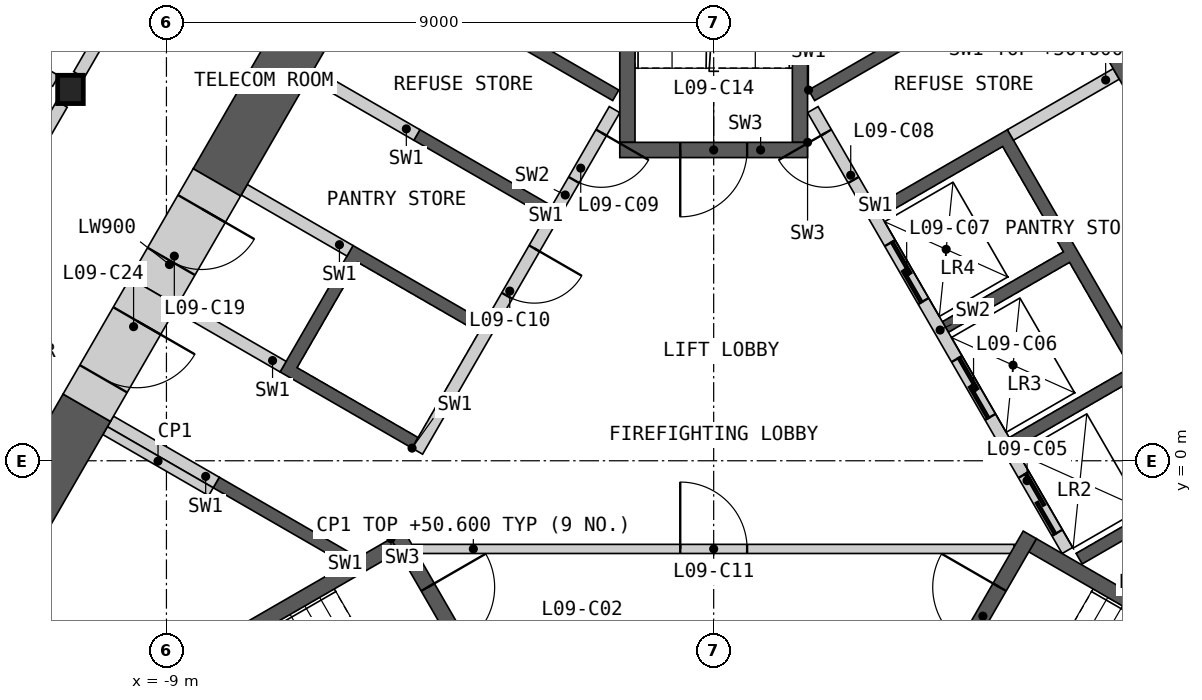
"""IFC4 building model, lengths in metres.
Left out: names, types, materials, properties, quantities, classifications, styles, units other than length and angle.
Written with IfcOpenShell. Run it as: python <this file> out.ifc"""

import sys

from ifc_helpers import new_model, si_unit, direction, frame, frame_2d, origin, origin_2d, place, context, subcontext, project, spatial, polyline, rectangle, i_section, outline, extrude, element, fill, save


model = new_model("IFC4")
c1 = context("Model", 3, precision=1e-05, world=origin(), true_north=direction((0.0, 1.0)))
c2 = subcontext(c1, "Body", "Model", "MODEL_VIEW")
j1 = project(units=[si_unit("LENGTHUNIT", "METRE"), si_unit("PLANEANGLEUNIT", "RADIAN")], contexts=[c1])
p1 = place(None, origin())
s1 = spatial("IfcSite", under=j1, at=p1, CompositionType="ELEMENT")
p2 = place(p1, origin())
s2 = spatial("IfcBuilding", under=s1, at=p2, CompositionType="ELEMENT")
p3 = place(p2, frame((0.0, 0.0, 46.8)))
s3 = spatial("IfcBuildingStorey", under=s2, at=p3, CompositionType="ELEMENT", Elevation=46.8)
p4 = place(p3, frame((-10.578, 6.107, 0.0), z_axis=(0.0, 0.0, 1.0), x_axis=(1.0, 0.0, 0.0)))
e1 = element("IfcColumn", 1, at=p4, inside=s3, PredefinedType="COLUMN", context=c2, shape_type="SweptSolid", body=[
    extrude(i_section(OverallWidth=0.421, OverallDepth=0.465, WebThickness=0.045, FlangeThickness=0.072, at=origin_2d()), origin(), (0.0, 0.0, 1.0), 4.2),
])
p5 = place(p3, origin())
e2 = element("IfcWall", 2, at=p5, inside=s3, PredefinedType="SHEAR", context=c2, shape_type="SweptSolid", body=[
    extrude(outline(polyline([(1.561, 6.097), (3.731, 7.35), (3.831, 7.177), (1.66, 5.924), (1.561, 6.097)])), origin(), (0.0, 0.0, 1.0), 3.8),
])
p6 = place(p3, origin())
e3 = element("IfcWall", 3, at=p6, inside=s3, PredefinedType="SHEAR", context=c2, shape_type="SweptSolid", body=[
    extrude(outline(polyline([(2.66, 4.192), (4.831, 5.445), (8.231, -0.444), (6.061, -1.697), (5.96, -1.524), (7.952, -0.374), (6.952, 1.358), (4.96, 0.208), (4.861, 0.381), (6.852, 1.531), (5.852, 3.263), (3.861, 2.113), (3.76, 2.287), (5.752, 3.437), (4.752, 5.169), (2.76, 4.019), (2.66, 4.192)])), origin(), (0.0, 0.0, 1.0), 3.8),
])
p7 = place(p3, frame((5.817, -1.476, 0.0), z_axis=(0.0, 0.0, 1.0), x_axis=(-0.500002616675, 0.866023893041, 0.0)))
e4 = element("IfcWall", 4, at=p7, inside=s3, PredefinedType="SOLIDWALL", context=c2, shape_type="SweptSolid", body=[
    extrude(rectangle(XDim=8.373, YDim=0.2, at=frame_2d((4.187, 0.0))), origin(), (0.0, 0.0, 1.0), 3.8),
])
p8 = place(p7, frame((0.337, 0.0, 0.0)))
e5 = element("IfcOpeningElement", 5, at=p8, cuts=e4, PredefinedType="OPENING", context=c2, shape_type="SweptSolid", body=[
    extrude(rectangle(XDim=1.1, YDim=2.1, at=frame_2d((0.55, 1.05))), frame((0.0, 0.11, 0.0), z_axis=(0.0, -1.0, 0.0), x_axis=(1.0, 0.0, 0.0)), (0.0, 0.0, 1.0), 0.22),
])
p9 = place(p7, frame((2.537, 0.0, 0.0)))
e6 = element("IfcOpeningElement", 6, at=p9, cuts=e4, PredefinedType="OPENING", context=c2, shape_type="SweptSolid", body=[
    extrude(rectangle(XDim=1.1, YDim=2.1, at=frame_2d((0.55, 1.05))), frame((0.0, 0.11, 0.0), z_axis=(0.0, -1.0, 0.0), x_axis=(1.0, 0.0, 0.0)), (0.0, 0.0, 1.0), 0.22),
])
p10 = place(p7, frame((4.737, 0.0, 0.0)))
e7 = element("IfcOpeningElement", 7, at=p10, cuts=e4, PredefinedType="OPENING", context=c2, shape_type="SweptSolid", body=[
    extrude(rectangle(XDim=1.1, YDim=2.1, at=frame_2d((0.55, 1.05))), frame((0.0, 0.11, 0.0), z_axis=(0.0, -1.0, 0.0), x_axis=(1.0, 0.0, 0.0)), (0.0, 0.0, 1.0), 0.22),
])
p11 = place(p7, frame((7.037, 0.0, 0.0)))
e8 = element("IfcOpeningElement", 8, at=p11, cuts=e4, PredefinedType="OPENING", context=c2, shape_type="SweptSolid", body=[
    extrude(rectangle(XDim=0.9, YDim=2.1, at=frame_2d((0.45, 1.05))), frame((0.0, 0.11, 0.0), z_axis=(0.0, -1.0, 0.0), x_axis=(1.0, 0.0, 0.0)), (0.0, 0.0, 1.0), 0.22),
])
p12 = place(p3, frame((4.881, 5.358, 0.0), z_axis=(0.0, 0.0, 1.0), x_axis=(0.866035824272, 0.499981950752, 0.0)))
e9 = element("IfcWall", 9, at=p12, inside=s3, PredefinedType="SHEAR", context=c2, shape_type="SweptSolid", body=[
    extrude(rectangle(XDim=2.009, YDim=0.2, at=frame_2d((1.004, 0.0))), origin(), (0.0, 0.0, 1.0), 3.8),
])
p13 = place(p3, origin())
e10 = element("IfcWall", 10, at=p13, inside=s3, PredefinedType="SHEAR", context=c2, shape_type="SweptSolid", body=[
    extrude(outline(polyline([(-6.061, -1.697), (-8.231, -0.444), (-8.131, -0.271), (-5.96, -1.524), (-6.061, -1.697)])), origin(), (0.0, 0.0, 1.0), 3.8),
])
p14 = place(p3, origin())
e11 = element("IfcWall", 11, at=p14, inside=s3, PredefinedType="SHEAR", context=c2, shape_type="SweptSolid", body=[
    extrude(outline(polyline([(-4.96, 0.208), (-7.131, 1.461), (-5.931, 3.54), (-3.76, 2.287), (-3.861, 2.113), (-5.852, 3.263), (-6.852, 1.531), (-4.861, 0.381), (-4.96, 0.208)])), origin(), (0.0, 0.0, 1.0), 3.8),
])
p15 = place(p3, origin())
e12 = element("IfcWall", 12, at=p15, inside=s3, PredefinedType="SHEAR", context=c2, shape_type="SweptSolid", body=[
    extrude(outline(polyline([(-2.76, 4.019), (-4.931, 5.272), (-4.831, 5.445), (-2.66, 4.192), (-2.76, 4.019)])), origin(), (0.0, 0.0, 1.0), 3.8),
])
p16 = place(p3, origin())
e13 = element("IfcWall", 13, at=p16, inside=s3, PredefinedType="SHEAR", context=c2, shape_type="SweptSolid", body=[
    extrude(outline(polyline([(-3.731, 7.35), (-1.561, 6.097), (-1.66, 5.924), (-3.831, 7.177), (-3.731, 7.35)])), origin(), (0.0, 0.0, 1.0), 3.8),
])
p17 = place(p3, frame((-1.631, 5.776, 0.0), z_axis=(0.0, 0.0, 1.0), x_axis=(-0.499992876559, -0.866029516466, 0.0)))
e14 = element("IfcWall", 14, at=p17, inside=s3, PredefinedType="SOLIDWALL", context=c2, shape_type="SweptSolid", body=[
    extrude(rectangle(XDim=6.486, YDim=0.2, at=frame_2d((3.243, 0.0))), origin(), (0.0, 0.0, 1.0), 3.8),
])
p18 = place(p17, frame((0.437, 0.0, 0.0)))
e15 = element("IfcOpeningElement", 15, at=p18, cuts=e14, PredefinedType="OPENING", context=c2, shape_type="SweptSolid", body=[
    extrude(rectangle(XDim=0.9, YDim=2.1, at=frame_2d((0.45, 1.05))), frame((0.0, 0.11, 0.0), z_axis=(0.0, -1.0, 0.0), x_axis=(1.0, 0.0, 0.0)), (0.0, 0.0, 1.0), 0.22),
])
p19 = place(p17, frame((2.637, 0.0, 0.0)))
e16 = element("IfcOpeningElement", 16, at=p19, cuts=e14, PredefinedType="OPENING", context=c2, shape_type="SweptSolid", body=[
    extrude(rectangle(XDim=0.9, YDim=2.1, at=frame_2d((0.45, 1.05))), frame((0.0, 0.11, 0.0), z_axis=(0.0, -1.0, 0.0), x_axis=(1.0, 0.0, 0.0)), (0.0, 0.0, 1.0), 0.22),
])
p20 = place(p3, frame((-4.881, 5.358, 0.0), z_axis=(0.0, 0.0, 1.0), x_axis=(-0.866035824272, 0.499981950752, 0.0)))
e17 = element("IfcWall", 17, at=p20, inside=s3, PredefinedType="SHEAR", context=c2, shape_type="SweptSolid", body=[
    extrude(rectangle(XDim=2.009, YDim=0.2, at=frame_2d((1.004, 0.0))), origin(), (0.0, 0.0, 1.0), 3.8),
])
p21 = place(p3, frame((-5.981, 3.453, 0.0), z_axis=(0.0, 0.0, 1.0), x_axis=(-0.866013584312, 0.500020471368, 0.0)))
e18 = element("IfcWall", 18, at=p21, inside=s3, PredefinedType="SHEAR", context=c2, shape_type="SweptSolid", body=[
    extrude(rectangle(XDim=2.009, YDim=0.2, at=frame_2d((1.005, 0.0))), origin(), (0.0, 0.0, 1.0), 3.8),
])
p22 = place(p3, frame((-7.081, 1.548, 0.0), z_axis=(0.0, 0.0, 1.0), x_axis=(-0.865983199114, 0.50007309351, 0.0)))
e19 = element("IfcWall", 19, at=p22, inside=s3, PredefinedType="SHEAR", context=c2, shape_type="SweptSolid", body=[
    extrude(rectangle(XDim=2.009, YDim=0.2, at=frame_2d((1.004, 0.0))), origin(), (0.0, 0.0, 1.0), 3.8),
])
p23 = place(p3, frame((-8.181, -0.357, 0.0), z_axis=(0.0, 0.0, 1.0), x_axis=(-0.866035824272, 0.499981950752, 0.0)))
e20 = element("IfcWall", 20, at=p23, inside=s3, PredefinedType="SHEAR", context=c2, shape_type="SweptSolid", body=[
    extrude(rectangle(XDim=2.009, YDim=0.2, at=frame_2d((1.004, 0.0))), origin(), (0.0, 0.0, 1.0), 3.8),
])
p24 = place(p3, frame((-4.941, -1.45, 0.0), z_axis=(0.0, 0.0, 1.0), x_axis=(1.0, 0.0, 0.0)))
e21 = element("IfcWall", 21, at=p24, inside=s3, PredefinedType="PARTITIONING", context=c2, shape_type="SweptSolid", body=[
    extrude(rectangle(XDim=9.882, YDim=0.15, at=frame_2d((4.941, 0.0))), origin(), (0.0, 0.0, 1.0), 3.8),
])
p25 = place(p24, frame((4.391, 0.0, 0.0)))
e22 = element("IfcOpeningElement", 22, at=p25, cuts=e21, PredefinedType="OPENING", context=c2, shape_type="SweptSolid", body=[
    extrude(rectangle(XDim=1.1, YDim=2.1, at=frame_2d((0.55, 1.05))), frame((0.0, 0.085, 0.0), z_axis=(0.0, -1.0, 0.0), x_axis=(1.0, 0.0, 0.0)), (0.0, 0.0, 1.0), 0.17),
])
p26 = place(p3, origin())
e23 = element("IfcWall", 23, at=p26, inside=s3, PredefinedType="SHEAR", context=c2, shape_type="SweptSolid", body=[
    extrude(outline(polyline([(-5.307, -1.281), (-10.374, -4.206), (-10.032, -4.298), (-5.182, -1.498), (-5.307, -1.281)])), origin(), (0.0, 0.0, 1.0), 3.8),
])
p27 = place(p3, frame((-5.199, -1.219, 0.0), z_axis=(0.0, 0.0, 1.0), x_axis=(0.499982516597, -0.866035497597, 0.0)))
e24 = element("IfcWall", 24, at=p27, inside=s3, PredefinedType="SHEAR", context=c2, shape_type="SweptSolid", body=[
    extrude(rectangle(XDim=3.088, YDim=0.25, at=frame_2d((1.544, 0.0))), origin(), (0.0, 0.0, 1.0), 3.8),
])
p28 = place(p27, frame((0.994, 0.0, 0.0)))
e25 = element("IfcOpeningElement", 25, at=p28, cuts=e24, PredefinedType="OPENING", context=c2, shape_type="SweptSolid", body=[
    extrude(rectangle(XDim=1.1, YDim=2.1, at=frame_2d((0.55, 1.05))), frame((0.0, 0.135, 0.0), z_axis=(0.0, -1.0, 0.0), x_axis=(1.0, 0.0, 0.0)), (0.0, 0.0, 1.0), 0.27),
])
p29 = place(p3, origin())
e26 = element("IfcWall", 26, at=p29, inside=s3, PredefinedType="SHEAR", context=c2, shape_type="SweptSolid", body=[
    extrude(outline(polyline([(10.032, -4.298), (10.374, -4.206), (5.307, -1.281), (5.182, -1.498), (10.032, -4.298)])), origin(), (0.0, 0.0, 1.0), 3.8),
])
p30 = place(p3, frame((3.655, -3.893, 0.0), z_axis=(0.0, 0.0, 1.0), x_axis=(0.499982516597, 0.866035497597, 0.0)))
e27 = element("IfcWall", 27, at=p30, inside=s3, PredefinedType="SHEAR", context=c2, shape_type="SweptSolid", body=[
    extrude(rectangle(XDim=3.088, YDim=0.25, at=frame_2d((1.544, 0.0))), origin(), (0.0, 0.0, 1.0), 3.8),
])
p31 = place(p30, frame((0.994, 0.0, 0.0)))
e28 = element("IfcOpeningElement", 28, at=p31, cuts=e27, PredefinedType="OPENING", context=c2, shape_type="SweptSolid", body=[
    extrude(rectangle(XDim=1.1, YDim=2.1, at=frame_2d((0.55, 1.05))), frame((0.0, 0.135, 0.0), z_axis=(0.0, -1.0, 0.0), x_axis=(1.0, 0.0, 0.0)), (0.0, 0.0, 1.0), 0.27),
])
p32 = place(p3, origin())
e29 = element("IfcWall", 29, at=p32, inside=s3, PredefinedType="SHEAR", context=c2, shape_type="SweptSolid", body=[
    extrude(outline(polyline([(1.544, 5.237), (1.544, 11.087), (1.294, 10.837), (1.294, 5.237), (1.544, 5.237)])), origin(), (0.0, 0.0, 1.0), 3.8),
])
p33 = place(p3, origin())
e30 = element("IfcWall", 30, at=p33, inside=s3, PredefinedType="SHEAR", context=c2, shape_type="SweptSolid", body=[
    extrude(outline(polyline([(-1.294, 10.837), (-1.544, 11.087), (-1.544, 5.237), (-1.294, 5.237), (-1.294, 10.837)])), origin(), (0.0, 0.0, 1.0), 3.8),
])
p34 = place(p3, frame((1.544, 5.112, 0.0), z_axis=(0.0, 0.0, 1.0), x_axis=(-1.0, 0.0, 0.0)))
e31 = element("IfcWall", 31, at=p34, inside=s3, PredefinedType="SHEAR", context=c2, shape_type="SweptSolid", body=[
    extrude(rectangle(XDim=3.088, YDim=0.25, at=frame_2d((1.544, 0.0))), origin(), (0.0, 0.0, 1.0), 3.8),
])
p35 = place(p34, frame((0.994, 0.0, 0.0)))
e32 = element("IfcOpeningElement", 32, at=p35, cuts=e31, PredefinedType="OPENING", context=c2, shape_type="SweptSolid", body=[
    extrude(rectangle(XDim=1.1, YDim=2.1, at=frame_2d((0.55, 1.05))), frame((0.0, 0.135, 0.0), z_axis=(0.0, -1.0, 0.0), x_axis=(1.0, 0.0, 0.0)), (0.0, 0.0, 1.0), 0.27),
])
p36 = place(p3, frame((-8.268, -0.509, 0.0), z_axis=(0.0, 0.0, 1.0), x_axis=(-0.866035824272, 0.499981950752, 0.0)))
e33 = element("IfcWall", 33, at=p36, inside=s3, PredefinedType="PARTITIONING", context=c2, shape_type="SweptSolid", body=[
    extrude(rectangle(XDim=2.009, YDim=0.15, at=frame_2d((1.004, 0.0))), origin(), (0.0, 0.0, 1.0), 3.8),
])
p37 = place(p3, frame((7.646, 5.486, 0.0), z_axis=(0.0, 0.0, 1.0), x_axis=(-0.499978218965, 0.866037978706, 0.0)))
e34 = element("IfcWall", 34, at=p37, inside=s3, PredefinedType="SHEAR", context=c2, shape_type="SweptSolid", body=[
    extrude(rectangle(XDim=4.076, YDim=0.9, at=frame_2d((2.038, 0.0))), origin(), (0.0, 0.0, 1.0), 3.8),
])
p38 = place(p3, frame((-10.31, 0.872, 0.0), z_axis=(0.0, 0.0, 1.0), x_axis=(-0.499991697393, -0.866030197244, 0.0)))
e35 = element("IfcWall", 35, at=p38, inside=s3, PredefinedType="SHEAR", context=c2, shape_type="SweptSolid", body=[
    extrude(rectangle(XDim=11.041, YDim=0.9, at=frame_2d((5.521, 0.0))), origin(), (0.0, 0.0, 1.0), 3.8),
])
p39 = place(p3, frame((-4.466, 10.995, 0.0), z_axis=(0.0, 0.0, 1.0), x_axis=(-0.500012427149, -0.866018228848, 0.0)))
e36 = element("IfcWall", 36, at=p39, inside=s3, PredefinedType="SHEAR", context=c2, shape_type="SweptSolid", body=[
    extrude(rectangle(XDim=7.409, YDim=0.9, at=frame_2d((3.705, 0.0))), origin(), (0.0, 0.0, 1.0), 3.8),
])
p40 = place(p3, frame((-8.17, 4.579, 0.0), z_axis=(0.0, 0.0, 1.0), x_axis=(-0.499888406853, -0.866089822532, 0.0)))
e37 = element("IfcWall", 37, at=p40, inside=s3, PredefinedType="SHEAR", context=c2, shape_type="SweptSolid", body=[
    extrude(rectangle(XDim=2.08, YDim=0.9, at=frame_2d((1.04, 0.0))), origin(), (0.0, 0.0, 1.0), 3.8),
])
p41 = place(p40, frame((0.5, 0.0, 0.0)))
e38 = element("IfcOpeningElement", 38, at=p41, cuts=e37, PredefinedType="OPENING", context=c2, shape_type="SweptSolid", body=[
    extrude(rectangle(XDim=1.0, YDim=2.1, at=frame_2d((0.5, 1.05))), frame((0.0, 0.46, 0.0), z_axis=(0.0, -1.0, 0.0), x_axis=(1.0, 0.0, 0.0)), (0.0, 0.0, 1.0), 0.92),
])
p42 = place(p3, frame((-9.21, 2.777, 0.0), z_axis=(0.0, 0.0, 1.0), x_axis=(-0.500077893725, -0.86598042715, 0.0)))
e39 = element("IfcWall", 39, at=p42, inside=s3, PredefinedType="SHEAR", context=c2, shape_type="SweptSolid", body=[
    extrude(rectangle(XDim=2.2, YDim=0.9, at=frame_2d((1.1, 0.0))), origin(), (0.0, 0.0, 1.0), 3.8),
])
p43 = place(p42, frame((0.55, 0.0, 0.0)))
e40 = element("IfcOpeningElement", 40, at=p43, cuts=e39, PredefinedType="OPENING", context=c2, shape_type="SweptSolid", body=[
    extrude(rectangle(XDim=1.1, YDim=2.1, at=frame_2d((0.55, 1.05))), frame((0.0, 0.46, 0.0), z_axis=(0.0, -1.0, 0.0), x_axis=(1.0, 0.0, 0.0)), (0.0, 0.0, 1.0), 0.92),
])
p44 = place(p3, frame((-10.439, 6.35, 0.0), z_axis=(0.0, 0.0, 1.0), x_axis=(0.50001002959, 0.86601961312, 0.0)))
e41 = element("IfcWall", 41, at=p44, inside=s3, PredefinedType="PARTITIONING", context=c2, shape_type="SweptSolid", body=[
    extrude(rectangle(XDim=10.019, YDim=0.2, at=frame_2d((5.009, 0.0))), origin(), (0.0, 0.0, 1.0), 3.8),
])
p45 = place(p44, frame((4.159, 0.0, 0.0)))
e42 = element("IfcOpeningElement", 42, at=p45, cuts=e41, PredefinedType="OPENING", context=c2, shape_type="SweptSolid", body=[
    extrude(rectangle(XDim=1.0, YDim=2.1, at=frame_2d((0.5, 1.05))), frame((0.0, 0.11, 0.0), z_axis=(0.0, -1.0, 0.0), x_axis=(1.0, 0.0, 0.0)), (0.0, 0.0, 1.0), 0.22),
])
p46 = place(p3, frame((5.429, 15.026, 0.0), z_axis=(0.0, 0.0, 1.0), x_axis=(0.50001002959, -0.86601961312, 0.0)))
e43 = element("IfcWall", 43, at=p46, inside=s3, PredefinedType="PARTITIONING", context=c2, shape_type="SweptSolid", body=[
    extrude(rectangle(XDim=10.019, YDim=0.2, at=frame_2d((5.009, 0.0))), origin(), (0.0, 0.0, 1.0), 3.8),
])
p47 = place(p46, frame((4.86, 0.0, 0.0)))
e44 = element("IfcOpeningElement", 44, at=p47, cuts=e43, PredefinedType="OPENING", context=c2, shape_type="SweptSolid", body=[
    extrude(rectangle(XDim=1.0, YDim=2.1, at=frame_2d((0.5, 1.05))), frame((0.0, 0.11, 0.0), z_axis=(0.0, -1.0, 0.0), x_axis=(1.0, 0.0, 0.0)), (0.0, 0.0, 1.0), 0.22),
])
p48 = place(p3, frame((-15.728, -2.811, 0.0), z_axis=(0.0, 0.0, 1.0), x_axis=(0.49999175339, 0.866030164915, 0.0)))
e45 = element("IfcWall", 45, at=p48, inside=s3, PredefinedType="PARTITIONING", context=c2, shape_type="SweptSolid", body=[
    extrude(rectangle(XDim=10.019, YDim=0.2, at=frame_2d((5.009, 0.0))), origin(), (0.0, 0.0, 1.0), 3.8),
])
p49 = place(p48, frame((4.059, 0.0, 0.0)))
e46 = element("IfcOpeningElement", 46, at=p49, cuts=e45, PredefinedType="OPENING", context=c2, shape_type="SweptSolid", body=[
    extrude(rectangle(XDim=1.8, YDim=2.1, at=frame_2d((0.9, 1.05))), frame((0.0, 0.11, 0.0), z_axis=(0.0, -1.0, 0.0), x_axis=(1.0, 0.0, 0.0)), (0.0, 0.0, 1.0), 0.22),
])
p50 = place(p3, frame((-21.947, 12.671, 0.0), z_axis=(0.0, 0.0, 1.0), x_axis=(0.866026729935, -0.499997703033, 0.0)))
e47 = element("IfcWall", 47, at=p50, inside=s3, PredefinedType="PARTITIONING", context=c2, shape_type="SweptSolid", body=[
    extrude(rectangle(XDim=12.848, YDim=0.2, at=frame_2d((6.424, 0.0))), origin(), (0.0, 0.0, 1.0), 2.885),
])
p51 = place(p8, origin())
e48 = element("IfcDoor", 48, at=p51, inside=s3, OperationType="SLIDING_TO_LEFT", PredefinedType="DOOR", context=c2, shape_type="SweptSolid", body=[
    extrude(rectangle(XDim=1.1, YDim=2.1, at=frame_2d((0.55, 1.05))), frame((0.0, 0.025, 0.0), z_axis=(0.0, -1.0, 0.0), x_axis=(1.0, 0.0, 0.0)), (0.0, 0.0, 1.0), 0.05),
])
fill(e5, e48)
p52 = place(p9, origin())
e49 = element("IfcDoor", 49, at=p52, inside=s3, OperationType="SLIDING_TO_LEFT", PredefinedType="DOOR", context=c2, shape_type="SweptSolid", body=[
    extrude(rectangle(XDim=1.1, YDim=2.1, at=frame_2d((0.55, 1.05))), frame((0.0, 0.025, 0.0), z_axis=(0.0, -1.0, 0.0), x_axis=(1.0, 0.0, 0.0)), (0.0, 0.0, 1.0), 0.05),
])
fill(e6, e49)
p53 = place(p10, origin())
e50 = element("IfcDoor", 50, at=p53, inside=s3, OperationType="SLIDING_TO_LEFT", PredefinedType="DOOR", context=c2, shape_type="SweptSolid", body=[
    extrude(rectangle(XDim=1.1, YDim=2.1, at=frame_2d((0.55, 1.05))), frame((0.0, 0.025, 0.0), z_axis=(0.0, -1.0, 0.0), x_axis=(1.0, 0.0, 0.0)), (0.0, 0.0, 1.0), 0.05),
])
fill(e7, e50)
p54 = place(p11, origin())
e51 = element("IfcDoor", 51, at=p54, inside=s3, OperationType="SINGLE_SWING_RIGHT", PredefinedType="DOOR", context=c2, shape_type="SweptSolid", body=[
    extrude(rectangle(XDim=0.9, YDim=2.1, at=frame_2d((0.45, 1.05))), frame((0.0, 0.025, 0.0), z_axis=(0.0, -1.0, 0.0), x_axis=(1.0, 0.0, 0.0)), (0.0, 0.0, 1.0), 0.05),
])
fill(e8, e51)
p55 = place(p18, origin())
e52 = element("IfcDoor", 52, at=p55, inside=s3, OperationType="SINGLE_SWING_LEFT", PredefinedType="DOOR", context=c2, shape_type="SweptSolid", body=[
    extrude(rectangle(XDim=0.9, YDim=2.1, at=frame_2d((0.45, 1.05))), frame((0.0, 0.025, 0.0), z_axis=(0.0, -1.0, 0.0), x_axis=(1.0, 0.0, 0.0)), (0.0, 0.0, 1.0), 0.05),
])
fill(e15, e52)
p56 = place(p19, origin())
e53 = element("IfcDoor", 53, at=p56, inside=s3, OperationType="SINGLE_SWING_LEFT", PredefinedType="DOOR", context=c2, shape_type="SweptSolid", body=[
    extrude(rectangle(XDim=0.9, YDim=2.1, at=frame_2d((0.45, 1.05))), frame((0.0, 0.025, 0.0), z_axis=(0.0, -1.0, 0.0), x_axis=(1.0, 0.0, 0.0)), (0.0, 0.0, 1.0), 0.05),
])
fill(e16, e53)
p57 = place(p25, origin())
e54 = element("IfcDoor", 54, at=p57, inside=s3, OperationType="SINGLE_SWING_LEFT", PredefinedType="DOOR", context=c2, shape_type="SweptSolid", body=[
    extrude(rectangle(XDim=1.1, YDim=2.1, at=frame_2d((0.55, 1.05))), frame((0.0, 0.025, 0.0), z_axis=(0.0, -1.0, 0.0), x_axis=(1.0, 0.0, 0.0)), (0.0, 0.0, 1.0), 0.05),
])
fill(e22, e54)
p58 = place(p28, origin())
e55 = element("IfcDoor", 55, at=p58, inside=s3, OperationType="SINGLE_SWING_LEFT", PredefinedType="DOOR", context=c2, shape_type="SweptSolid", body=[
    extrude(rectangle(XDim=1.1, YDim=2.1, at=frame_2d((0.55, 1.05))), frame((0.0, 0.025, 0.0), z_axis=(0.0, -1.0, 0.0), x_axis=(1.0, 0.0, 0.0)), (0.0, 0.0, 1.0), 0.05),
])
fill(e25, e55)
p59 = place(p31, origin())
e56 = element("IfcDoor", 56, at=p59, inside=s3, OperationType="SINGLE_SWING_RIGHT", PredefinedType="DOOR", context=c2, shape_type="SweptSolid", body=[
    extrude(rectangle(XDim=1.1, YDim=2.1, at=frame_2d((0.55, 1.05))), frame((0.0, 0.025, 0.0), z_axis=(0.0, -1.0, 0.0), x_axis=(1.0, 0.0, 0.0)), (0.0, 0.0, 1.0), 0.05),
])
fill(e28, e56)
p60 = place(p35, origin())
e57 = element("IfcDoor", 57, at=p60, inside=s3, OperationType="SINGLE_SWING_RIGHT", PredefinedType="DOOR", context=c2, shape_type="SweptSolid", body=[
    extrude(rectangle(XDim=1.1, YDim=2.1, at=frame_2d((0.55, 1.05))), frame((0.0, 0.025, 0.0), z_axis=(0.0, -1.0, 0.0), x_axis=(1.0, 0.0, 0.0)), (0.0, 0.0, 1.0), 0.05),
])
fill(e32, e57)
p61 = place(p41, origin())
e58 = element("IfcDoor", 58, at=p61, inside=s3, OperationType="SINGLE_SWING_LEFT", PredefinedType="DOOR", context=c2, shape_type="SweptSolid", body=[
    extrude(rectangle(XDim=1.0, YDim=2.1, at=frame_2d((0.5, 1.05))), frame((0.0, 0.205, 0.0), z_axis=(0.0, -1.0, 0.0), x_axis=(1.0, 0.0, 0.0)), (0.0, 0.0, 1.0), 0.05),
])
fill(e38, e58)
p62 = place(p43, origin())
e59 = element("IfcDoor", 59, at=p62, inside=s3, OperationType="SINGLE_SWING_LEFT", PredefinedType="DOOR", context=c2, shape_type="SweptSolid", body=[
    extrude(rectangle(XDim=1.1, YDim=2.1, at=frame_2d((0.55, 1.05))), frame((0.0, 0.205, 0.0), z_axis=(0.0, -1.0, 0.0), x_axis=(1.0, 0.0, 0.0)), (0.0, 0.0, 1.0), 0.05),
])
fill(e40, e59)
save(model, sys.argv[1])
